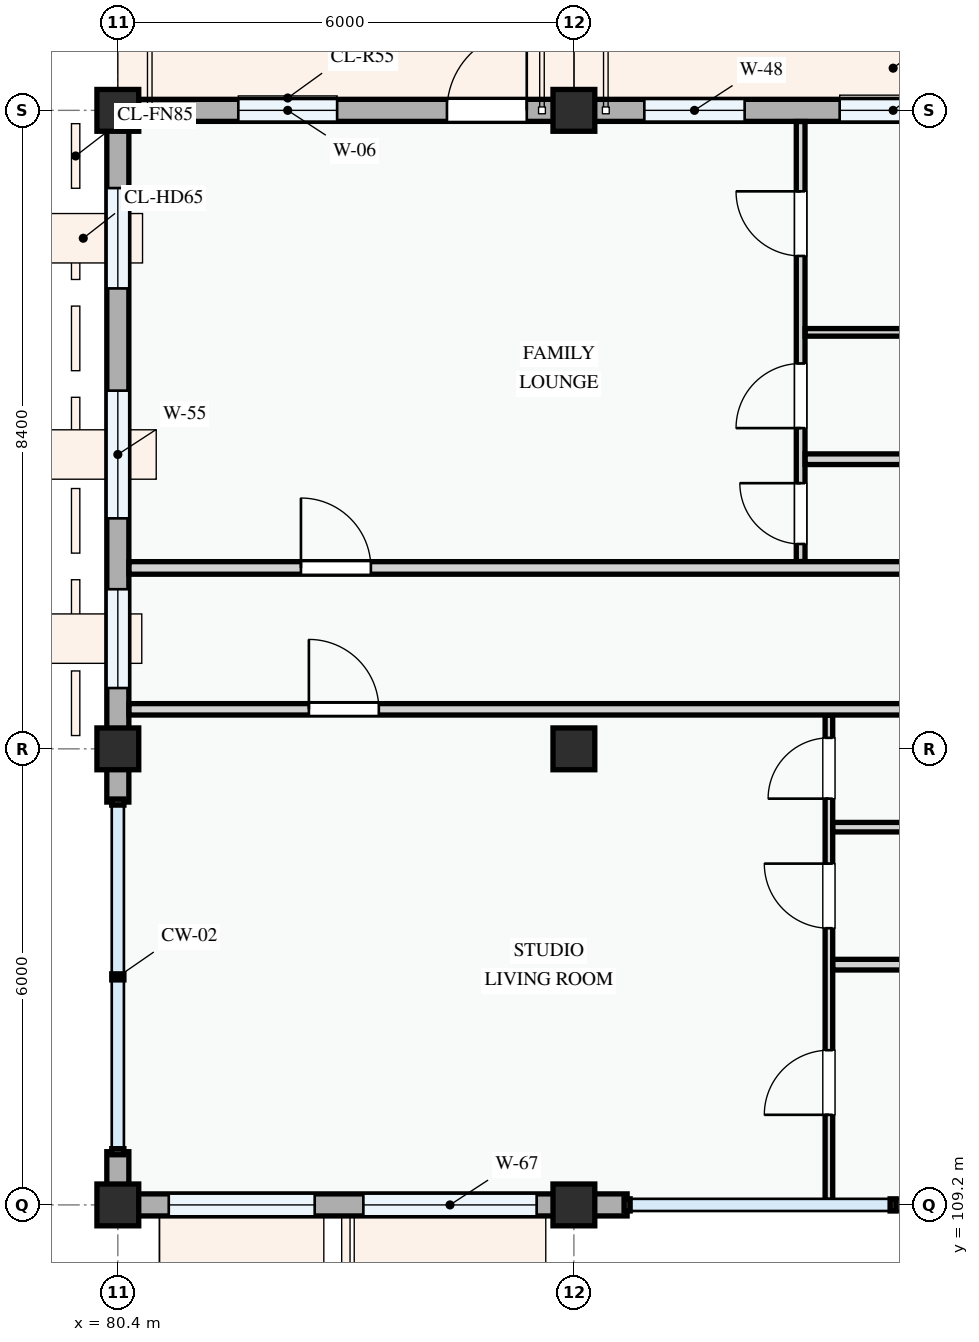
"""IFC4 building model, lengths in metres.
Left out: names, types, materials, properties, quantities, classifications, styles, units other than length and angle.
Written with IfcOpenShell. Run it as: python <this file> out.ifc"""

import sys

from ifc_helpers import new_model, si_unit, direction, frame, frame_2d, origin, origin_2d, place, context, subcontext, project, spatial, rectangle, extrude, element, fill, save


model = new_model("IFC4")
c1 = context("Model", 3, precision=1e-05, world=origin(), true_north=direction((0.0, 1.0)))
c2 = subcontext(c1, "Body", "Model", "MODEL_VIEW")
j1 = project(units=[si_unit("LENGTHUNIT", "METRE"), si_unit("PLANEANGLEUNIT", "RADIAN")], contexts=[c1])
p1 = place(None, origin())
s1 = spatial("IfcSite", under=j1, at=p1, CompositionType="ELEMENT")
p2 = place(p1, origin())
s2 = spatial("IfcBuilding", under=s1, at=p2, CompositionType="ELEMENT")
p3 = place(p2, frame((0.0, 0.0, 24.6)))
s3 = spatial("IfcBuildingStorey", under=s2, at=p3, CompositionType="ELEMENT", Elevation=24.6)
for number, where, z_axis, x_axis in (
    (1, (80.4, 109.2, 0.0), (0.0, 0.0, 1.0), (1.0, 0.0, 0.0)),
    (2, (80.4, 115.2, 0.0), (0.0, 0.0, 1.0), (1.0, 0.0, 0.0)),
    (3, (80.4, 123.6, 0.0), (0.0, 0.0, 1.0), (1.0, 0.0, 0.0)),
    (4, (86.4, 109.2, 0.0), (0.0, 0.0, 1.0), (1.0, 0.0, 0.0)),
    (5, (86.4, 115.2, 0.0), (0.0, 0.0, 1.0), (1.0, 0.0, 0.0)),
    (6, (86.4, 123.6, 0.0), (0.0, 0.0, 1.0), (1.0, 0.0, 0.0)),
):
    element("IfcColumn", number, at=place(p3, frame(where, z_axis=z_axis, x_axis=x_axis)), inside=s3, PredefinedType="COLUMN", context=c2, shape_type="SweptSolid", body=[
        extrude(rectangle(XDim=0.55, YDim=0.55, at=origin_2d()), origin(), (0.0, 0.0, 1.0), 3.3),
    ])
p4 = place(p3, frame((94.8, 123.6, 0.0), z_axis=(0.0, 0.0, 1.0), x_axis=(-1.0, 0.0, 0.0)))
e7 = element("IfcWall", 7, at=p4, inside=s3, PredefinedType="STANDARD", context=c2, shape_type="SweptSolid", body=[
    extrude(rectangle(XDim=8.4, YDim=0.29, at=frame_2d((4.2, 0.0))), origin(), (0.0, 0.0, 1.0), 2.375),
])
p5 = place(p4, frame((0.62, 0.0, 0.0)))
e8 = element("IfcOpeningElement", 8, at=p5, cuts=e7, PredefinedType="OPENING", context=c2, shape_type="SweptSolid", body=[
    extrude(rectangle(XDim=1.6, YDim=2.2, at=frame_2d((0.8, 1.1))), frame((0.0, 0.155, 0.0), z_axis=(0.0, -1.0, 0.0), x_axis=(1.0, 0.0, 0.0)), (0.0, 0.0, 1.0), 0.31),
])
p6 = place(p4, frame((2.783, 0.0, 0.78)))
e9 = element("IfcOpeningElement", 9, at=p6, cuts=e7, PredefinedType="OPENING", context=c2, shape_type="SweptSolid", body=[
    extrude(rectangle(XDim=2.12, YDim=1.44, at=frame_2d((1.06, 0.72))), frame((0.0, 0.155, 0.0), z_axis=(0.0, -1.0, 0.0), x_axis=(1.0, 0.0, 0.0)), (0.0, 0.0, 1.0), 0.31),
])
p7 = place(p4, frame((6.153, 0.0, 0.78)))
e10 = element("IfcOpeningElement", 10, at=p7, cuts=e7, PredefinedType="OPENING", context=c2, shape_type="SweptSolid", body=[
    extrude(rectangle(XDim=1.32, YDim=1.35, at=frame_2d((0.66, 0.675))), frame((0.0, 0.155, 0.0), z_axis=(0.0, -1.0, 0.0), x_axis=(1.0, 0.0, 0.0)), (0.0, 0.0, 1.0), 0.31),
])
p8 = place(p3, frame((86.4, 123.6, 0.0), z_axis=(0.0, 0.0, 1.0), x_axis=(-1.0, 0.0, 0.0)))
e11 = element("IfcWall", 11, at=p8, inside=s3, PredefinedType="STANDARD", context=c2, shape_type="SweptSolid", body=[
    extrude(rectangle(XDim=6.0, YDim=0.29, at=frame_2d((3.0, 0.0))), origin(), (0.0, 0.0, 1.0), 2.475),
])
p9 = place(p8, frame((0.62, 0.0, 0.0)))
e12 = element("IfcOpeningElement", 12, at=p9, cuts=e11, PredefinedType="OPENING", context=c2, shape_type="SweptSolid", body=[
    extrude(rectangle(XDim=1.05, YDim=2.15, at=frame_2d((0.525, 1.075))), frame((0.0, 0.155, 0.0), z_axis=(0.0, -1.0, 0.0), x_axis=(1.0, 0.0, 0.0)), (0.0, 0.0, 1.0), 0.31),
])
p10 = place(p8, frame((3.115, 0.0, 0.78)))
e13 = element("IfcOpeningElement", 13, at=p10, cuts=e11, PredefinedType="OPENING", context=c2, shape_type="SweptSolid", body=[
    extrude(rectangle(XDim=1.3, YDim=1.4, at=frame_2d((0.65, 0.7))), frame((0.0, 0.155, 0.0), z_axis=(0.0, -1.0, 0.0), x_axis=(1.0, 0.0, 0.0)), (0.0, 0.0, 1.0), 0.31),
])
p11 = place(p3, frame((80.4, 123.6, 0.0), z_axis=(0.0, 0.0, 1.0), x_axis=(0.0, -1.0, 0.0)))
e14 = element("IfcWall", 14, at=p11, inside=s3, PredefinedType="STANDARD", context=c2, shape_type="SweptSolid", body=[
    extrude(rectangle(XDim=8.4, YDim=0.29, at=frame_2d((4.2, 0.0))), origin(), (0.0, 0.0, 1.0), 2.425),
])
p12 = place(p11, frame((1.022, 0.0, 0.78)))
e15 = element("IfcOpeningElement", 15, at=p12, cuts=e14, PredefinedType="OPENING", context=c2, shape_type="SweptSolid", body=[
    extrude(rectangle(XDim=1.32, YDim=1.35, at=frame_2d((0.66, 0.675))), frame((0.0, 0.155, 0.0), z_axis=(0.0, -1.0, 0.0), x_axis=(1.0, 0.0, 0.0)), (0.0, 0.0, 1.0), 0.31),
])
p13 = place(p11, frame((3.688, 0.0, 0.78)))
e16 = element("IfcOpeningElement", 16, at=p13, cuts=e14, PredefinedType="OPENING", context=c2, shape_type="SweptSolid", body=[
    extrude(rectangle(XDim=1.68, YDim=1.46, at=frame_2d((0.84, 0.73))), frame((0.0, 0.155, 0.0), z_axis=(0.0, -1.0, 0.0), x_axis=(1.0, 0.0, 0.0)), (0.0, 0.0, 1.0), 0.31),
])
p14 = place(p11, frame((6.3, 0.0, 0.78)))
e17 = element("IfcOpeningElement", 17, at=p14, cuts=e14, PredefinedType="OPENING", context=c2, shape_type="SweptSolid", body=[
    extrude(rectangle(XDim=1.3, YDim=1.4, at=frame_2d((0.65, 0.7))), frame((0.0, 0.155, 0.0), z_axis=(0.0, -1.0, 0.0), x_axis=(1.0, 0.0, 0.0)), (0.0, 0.0, 1.0), 0.31),
])
p15 = place(p3, frame((80.4, 115.2, 0.0), z_axis=(0.0, 0.0, 1.0), x_axis=(0.0, -1.0, 0.0)))
e18 = element("IfcWall", 18, at=p15, inside=s3, PredefinedType="STANDARD", context=c2, shape_type="SweptSolid", body=[
    extrude(rectangle(XDim=0.7, YDim=0.29, at=frame_2d((0.35, 0.0))), origin(), (0.0, 0.0, 1.0), 2.575),
])
p16 = place(p3, frame((80.4, 109.9, 0.0), z_axis=(0.0, 0.0, 1.0), x_axis=(0.0, -1.0, 0.0)))
e19 = element("IfcWall", 19, at=p16, inside=s3, PredefinedType="STANDARD", context=c2, shape_type="SweptSolid", body=[
    extrude(rectangle(XDim=0.553, YDim=0.29, at=frame_2d((0.276, 0.0))), origin(), (0.0, 0.0, 1.0), 2.575),
])
p17 = place(p3, frame((80.4, 109.2, 0.0), z_axis=(0.0, 0.0, 1.0), x_axis=(1.0, 0.0, 0.0)))
e20 = element("IfcWall", 20, at=p17, inside=s3, PredefinedType="STANDARD", context=c2, shape_type="SweptSolid", body=[
    extrude(rectangle(XDim=6.0, YDim=0.29, at=frame_2d((3.0, 0.0))), origin(), (0.0, 0.0, 1.0), 2.475),
])
p18 = place(p17, frame((0.67, 0.0, 0.78)))
e21 = element("IfcOpeningElement", 21, at=p18, cuts=e20, PredefinedType="OPENING", context=c2, shape_type="SweptSolid", body=[
    extrude(rectangle(XDim=1.92, YDim=1.44, at=frame_2d((0.96, 0.72))), frame((0.0, 0.155, 0.0), z_axis=(0.0, -1.0, 0.0), x_axis=(1.0, 0.0, 0.0)), (0.0, 0.0, 1.0), 0.31),
])
p19 = place(p17, frame((3.23, 0.0, 0.78)))
e22 = element("IfcOpeningElement", 22, at=p19, cuts=e20, PredefinedType="OPENING", context=c2, shape_type="SweptSolid", body=[
    extrude(rectangle(XDim=2.28, YDim=1.46, at=frame_2d((1.14, 0.73))), frame((0.0, 0.155, 0.0), z_axis=(0.0, -1.0, 0.0), x_axis=(1.0, 0.0, 0.0)), (0.0, 0.0, 1.0), 0.31),
])
p20 = place(p3, frame((86.4, 109.2, 0.0), z_axis=(0.0, 0.0, 1.0), x_axis=(1.0, 0.0, 0.0)))
e23 = element("IfcWall", 23, at=p20, inside=s3, PredefinedType="STANDARD", context=c2, shape_type="SweptSolid", body=[
    extrude(rectangle(XDim=0.7, YDim=0.29, at=frame_2d((0.35, 0.0))), origin(), (0.0, 0.0, 1.0), 2.375),
])
p21 = place(p3, frame((89.755, 109.26, 0.0), z_axis=(0.0, 0.0, 1.0), x_axis=(0.0, 1.0, 0.0)))
e24 = element("IfcWall", 24, at=p21, inside=s3, PredefinedType="PARTITIONING", context=c2, shape_type="SweptSolid", body=[
    extrude(rectangle(XDim=6.383, YDim=0.1, at=frame_2d((3.191, 0.0))), origin(), (0.0, 0.0, 1.0), 3.0),
])
p22 = place(p21, frame((1.125, 0.0, 0.0)))
e25 = element("IfcOpeningElement", 25, at=p22, cuts=e24, PredefinedType="OPENING", context=c2, shape_type="SweptSolid", body=[
    extrude(rectangle(XDim=0.85, YDim=2.1, at=frame_2d((0.425, 1.05))), frame((0.0, 0.06, 0.0), z_axis=(0.0, -1.0, 0.0), x_axis=(1.0, 0.0, 0.0)), (0.0, 0.0, 1.0), 0.12),
])
p23 = place(p21, frame((3.58, 0.0, 0.0)))
e26 = element("IfcOpeningElement", 26, at=p23, cuts=e24, PredefinedType="OPENING", context=c2, shape_type="SweptSolid", body=[
    extrude(rectangle(XDim=0.85, YDim=2.1, at=frame_2d((0.425, 1.05))), frame((0.0, 0.06, 0.0), z_axis=(0.0, -1.0, 0.0), x_axis=(1.0, 0.0, 0.0)), (0.0, 0.0, 1.0), 0.12),
])
p24 = place(p21, frame((5.285, 0.0, 0.0)))
e27 = element("IfcOpeningElement", 27, at=p24, cuts=e24, PredefinedType="OPENING", context=c2, shape_type="SweptSolid", body=[
    extrude(rectangle(XDim=0.8, YDim=2.1, at=frame_2d((0.4, 1.05))), frame((0.0, 0.06, 0.0), z_axis=(0.0, -1.0, 0.0), x_axis=(1.0, 0.0, 0.0)), (0.0, 0.0, 1.0), 0.12),
])
p25 = place(p3, frame((89.807, 112.361, 0.0), z_axis=(0.0, 0.0, 1.0), x_axis=(1.0, 0.0, 0.0)))
e28 = element("IfcWall", 28, at=p25, inside=s3, PredefinedType="PARTITIONING", context=c2, shape_type="SweptSolid", body=[
    extrude(rectangle(XDim=9.141, YDim=0.14, at=frame_2d((4.571, 0.0))), origin(), (0.0, 0.0, 1.0), 3.0),
])
p26 = place(p3, frame((89.807, 114.17, 0.0), z_axis=(0.0, 0.0, 1.0), x_axis=(1.0, 0.0, 0.0)))
e29 = element("IfcWall", 29, at=p26, inside=s3, PredefinedType="PARTITIONING", context=c2, shape_type="SweptSolid", body=[
    extrude(rectangle(XDim=9.141, YDim=0.125, at=frame_2d((4.571, 0.0))), origin(), (0.0, 0.0, 1.0), 3.0),
])
p27 = place(p3, frame((89.383, 117.665, 0.0), z_axis=(0.0, 0.0, 1.0), x_axis=(0.0, 1.0, 0.0)))
e30 = element("IfcWall", 30, at=p27, inside=s3, PredefinedType="PARTITIONING", context=c2, shape_type="SweptSolid", body=[
    extrude(rectangle(XDim=5.788, YDim=0.115, at=frame_2d((2.894, 0.0))), origin(), (0.0, 0.0, 1.0), 3.0),
])
p28 = place(p27, frame((0.231, 0.0, 0.0)))
e31 = element("IfcOpeningElement", 31, at=p28, cuts=e30, PredefinedType="OPENING", context=c2, shape_type="SweptSolid", body=[
    extrude(rectangle(XDim=0.8, YDim=2.1, at=frame_2d((0.4, 1.05))), frame((0.0, 0.067, 0.0), z_axis=(0.0, -1.0, 0.0), x_axis=(1.0, 0.0, 0.0)), (0.0, 0.0, 1.0), 0.135),
])
p29 = place(p27, frame((1.755, 0.0, 0.0)))
e32 = element("IfcOpeningElement", 32, at=p29, cuts=e30, PredefinedType="OPENING", context=c2, shape_type="SweptSolid", body=[
    extrude(rectangle(XDim=0.85, YDim=2.1, at=frame_2d((0.425, 1.05))), frame((0.0, 0.067, 0.0), z_axis=(0.0, -1.0, 0.0), x_axis=(1.0, 0.0, 0.0)), (0.0, 0.0, 1.0), 0.135),
])
p30 = place(p27, frame((4.02, 0.0, 0.0)))
e33 = element("IfcOpeningElement", 33, at=p30, cuts=e30, PredefinedType="OPENING", context=c2, shape_type="SweptSolid", body=[
    extrude(rectangle(XDim=0.85, YDim=2.1, at=frame_2d((0.425, 1.05))), frame((0.0, 0.067, 0.0), z_axis=(0.0, -1.0, 0.0), x_axis=(1.0, 0.0, 0.0)), (0.0, 0.0, 1.0), 0.135),
])
p31 = place(p3, frame((89.443, 120.679, 0.0), z_axis=(0.0, 0.0, 1.0), x_axis=(1.0, 0.0, 0.0)))
e34 = element("IfcWall", 34, at=p31, inside=s3, PredefinedType="PARTITIONING", context=c2, shape_type="SweptSolid", body=[
    extrude(rectangle(XDim=9.495, YDim=0.1, at=frame_2d((4.748, 0.0))), origin(), (0.0, 0.0, 1.0), 3.0),
])
p32 = place(p3, frame((89.443, 119.01, 0.0), z_axis=(0.0, 0.0, 1.0), x_axis=(1.0, 0.0, 0.0)))
e35 = element("IfcWall", 35, at=p32, inside=s3, PredefinedType="PARTITIONING", context=c2, shape_type="SweptSolid", body=[
    extrude(rectangle(XDim=9.495, YDim=0.14, at=frame_2d((4.748, 0.0))), origin(), (0.0, 0.0, 1.0), 3.0),
])
p33 = place(p3, frame((80.547, 115.72, 0.0), z_axis=(0.0, 0.0, 1.0), x_axis=(1.0, 0.0, 0.0)))
e36 = element("IfcWall", 36, at=p33, inside=s3, PredefinedType="PARTITIONING", context=c2, shape_type="SweptSolid", body=[
    extrude(rectangle(XDim=69.503, YDim=0.15, at=frame_2d((34.751, 0.0))), origin(), (0.0, 0.0, 1.0), 3.0),
])
p34 = place(p33, frame((2.367, 0.0, 0.0)))
e37 = element("IfcOpeningElement", 37, at=p34, cuts=e36, PredefinedType="OPENING", context=c2, shape_type="SweptSolid", body=[
    extrude(rectangle(XDim=0.92, YDim=2.1, at=frame_2d((0.46, 1.05))), frame((0.0, 0.085, 0.0), z_axis=(0.0, -1.0, 0.0), x_axis=(1.0, 0.0, 0.0)), (0.0, 0.0, 1.0), 0.17),
])
p35 = place(p33, frame((23.968, 0.0, 0.0)))
e38 = element("IfcOpeningElement", 38, at=p35, cuts=e36, PredefinedType="OPENING", context=c2, shape_type="SweptSolid", body=[
    extrude(rectangle(XDim=0.92, YDim=2.1, at=frame_2d((0.46, 1.05))), frame((0.0, 0.085, 0.0), z_axis=(0.0, -1.0, 0.0), x_axis=(1.0, 0.0, 0.0)), (0.0, 0.0, 1.0), 0.17),
])
p36 = place(p33, frame((39.133, 0.0, 0.0)))
e39 = element("IfcOpeningElement", 39, at=p36, cuts=e36, PredefinedType="OPENING", context=c2, shape_type="SweptSolid", body=[
    extrude(rectangle(XDim=0.92, YDim=2.1, at=frame_2d((0.46, 1.05))), frame((0.0, 0.085, 0.0), z_axis=(0.0, -1.0, 0.0), x_axis=(1.0, 0.0, 0.0)), (0.0, 0.0, 1.0), 0.17),
])
p37 = place(p33, frame((59.909, 0.0, 0.0)))
e40 = element("IfcOpeningElement", 40, at=p37, cuts=e36, PredefinedType="OPENING", context=c2, shape_type="SweptSolid", body=[
    extrude(rectangle(XDim=0.96, YDim=2.12, at=frame_2d((0.48, 1.06))), frame((0.0, 0.085, 0.0), z_axis=(0.0, -1.0, 0.0), x_axis=(1.0, 0.0, 0.0)), (0.0, 0.0, 1.0), 0.17),
])
p38 = place(p3, frame((80.547, 117.58, 0.0), z_axis=(0.0, 0.0, 1.0), x_axis=(1.0, 0.0, 0.0)))
e41 = element("IfcWall", 41, at=p38, inside=s3, PredefinedType="PARTITIONING", context=c2, shape_type="SweptSolid", body=[
    extrude(rectangle(XDim=71.993, YDim=0.165, at=frame_2d((35.997, 0.0))), origin(), (0.0, 0.0, 1.0), 3.0),
])
p39 = place(p38, frame((2.262, 0.0, 0.0)))
e42 = element("IfcOpeningElement", 42, at=p39, cuts=e41, PredefinedType="OPENING", context=c2, shape_type="SweptSolid", body=[
    extrude(rectangle(XDim=0.92, YDim=2.1, at=frame_2d((0.46, 1.05))), frame((0.0, 0.093, 0.0), z_axis=(0.0, -1.0, 0.0), x_axis=(1.0, 0.0, 0.0)), (0.0, 0.0, 1.0), 0.185),
])
p40 = place(p38, frame((23.945, 0.0, 0.0)))
e43 = element("IfcOpeningElement", 43, at=p40, cuts=e41, PredefinedType="OPENING", context=c2, shape_type="SweptSolid", body=[
    extrude(rectangle(XDim=0.92, YDim=2.1, at=frame_2d((0.46, 1.05))), frame((0.0, 0.093, 0.0), z_axis=(0.0, -1.0, 0.0), x_axis=(1.0, 0.0, 0.0)), (0.0, 0.0, 1.0), 0.185),
])
p41 = place(p38, frame((39.133, 0.0, 0.0)))
e44 = element("IfcOpeningElement", 44, at=p41, cuts=e41, PredefinedType="OPENING", context=c2, shape_type="SweptSolid", body=[
    extrude(rectangle(XDim=0.92, YDim=2.1, at=frame_2d((0.46, 1.05))), frame((0.0, 0.093, 0.0), z_axis=(0.0, -1.0, 0.0), x_axis=(1.0, 0.0, 0.0)), (0.0, 0.0, 1.0), 0.185),
])
p42 = place(p38, frame((59.929, 0.0, 0.0)))
e45 = element("IfcOpeningElement", 45, at=p42, cuts=e41, PredefinedType="OPENING", context=c2, shape_type="SweptSolid", body=[
    extrude(rectangle(XDim=0.92, YDim=2.1, at=frame_2d((0.46, 1.05))), frame((0.0, 0.093, 0.0), z_axis=(0.0, -1.0, 0.0), x_axis=(1.0, 0.0, 0.0)), (0.0, 0.0, 1.0), 0.185),
])
p43 = place(p6, origin())
e46 = element("IfcWindow", 46, at=p43, inside=s3, PartitioningType="DOUBLE_PANEL_VERTICAL", PredefinedType="WINDOW", context=c2, shape_type="SweptSolid", body=[
    extrude(rectangle(XDim=2.12, YDim=1.44, at=frame_2d((1.06, 0.72))), frame((0.0, 0.03, 0.0), z_axis=(0.0, -1.0, 0.0), x_axis=(1.0, 0.0, 0.0)), (0.0, 0.0, 1.0), 0.06),
])
fill(e9, e46)
p44 = place(p7, origin())
e47 = element("IfcWindow", 47, at=p44, inside=s3, PartitioningType="SINGLE_PANEL", PredefinedType="WINDOW", context=c2, shape_type="SweptSolid", body=[
    extrude(rectangle(XDim=1.32, YDim=1.35, at=frame_2d((0.66, 0.675))), frame((0.0, 0.03, 0.0), z_axis=(0.0, -1.0, 0.0), x_axis=(1.0, 0.0, 0.0)), (0.0, 0.0, 1.0), 0.06),
])
fill(e10, e47)
p45 = place(p9, frame((1.05, 0.0, 0.0), z_axis=(0.0, 0.0, 1.0), x_axis=(-1.0, 0.0, 0.0)))
e48 = element("IfcDoor", 48, at=p45, inside=s3, OperationType="SINGLE_SWING_RIGHT", PredefinedType="DOOR", context=c2, shape_type="SweptSolid", body=[
    extrude(rectangle(XDim=1.05, YDim=2.15, at=frame_2d((0.525, 1.075))), frame((0.0, 0.025, 0.0), z_axis=(0.0, -1.0, 0.0), x_axis=(1.0, 0.0, 0.0)), (0.0, 0.0, 1.0), 0.05),
])
fill(e12, e48)
p46 = place(p10, origin())
e49 = element("IfcWindow", 49, at=p46, inside=s3, PartitioningType="SINGLE_PANEL", PredefinedType="WINDOW", context=c2, shape_type="SweptSolid", body=[
    extrude(rectangle(XDim=1.3, YDim=1.4, at=frame_2d((0.65, 0.7))), frame((0.0, 0.03, 0.0), z_axis=(0.0, -1.0, 0.0), x_axis=(1.0, 0.0, 0.0)), (0.0, 0.0, 1.0), 0.06),
])
fill(e13, e49)
p47 = place(p12, origin())
e50 = element("IfcWindow", 50, at=p47, inside=s3, PartitioningType="SINGLE_PANEL", PredefinedType="WINDOW", context=c2, shape_type="SweptSolid", body=[
    extrude(rectangle(XDim=1.32, YDim=1.35, at=frame_2d((0.66, 0.675))), frame((0.0, 0.03, 0.0), z_axis=(0.0, -1.0, 0.0), x_axis=(1.0, 0.0, 0.0)), (0.0, 0.0, 1.0), 0.06),
])
fill(e15, e50)
p48 = place(p13, origin())
e51 = element("IfcWindow", 51, at=p48, inside=s3, PartitioningType="DOUBLE_PANEL_VERTICAL", PredefinedType="WINDOW", context=c2, shape_type="SweptSolid", body=[
    extrude(rectangle(XDim=1.68, YDim=1.46, at=frame_2d((0.84, 0.73))), frame((0.0, 0.03, 0.0), z_axis=(0.0, -1.0, 0.0), x_axis=(1.0, 0.0, 0.0)), (0.0, 0.0, 1.0), 0.06),
])
fill(e16, e51)
p49 = place(p14, origin())
e52 = element("IfcWindow", 52, at=p49, inside=s3, PartitioningType="SINGLE_PANEL", PredefinedType="WINDOW", context=c2, shape_type="SweptSolid", body=[
    extrude(rectangle(XDim=1.3, YDim=1.4, at=frame_2d((0.65, 0.7))), frame((0.0, 0.03, 0.0), z_axis=(0.0, -1.0, 0.0), x_axis=(1.0, 0.0, 0.0)), (0.0, 0.0, 1.0), 0.06),
])
fill(e17, e52)
p50 = place(p18, origin())
e53 = element("IfcWindow", 53, at=p50, inside=s3, PartitioningType="DOUBLE_PANEL_VERTICAL", PredefinedType="WINDOW", context=c2, shape_type="SweptSolid", body=[
    extrude(rectangle(XDim=1.92, YDim=1.44, at=frame_2d((0.96, 0.72))), frame((0.0, 0.03, 0.0), z_axis=(0.0, -1.0, 0.0), x_axis=(1.0, 0.0, 0.0)), (0.0, 0.0, 1.0), 0.06),
])
fill(e21, e53)
p51 = place(p19, origin())
e54 = element("IfcWindow", 54, at=p51, inside=s3, PartitioningType="DOUBLE_PANEL_VERTICAL", PredefinedType="WINDOW", context=c2, shape_type="SweptSolid", body=[
    extrude(rectangle(XDim=2.28, YDim=1.46, at=frame_2d((1.14, 0.73))), frame((0.0, 0.03, 0.0), z_axis=(0.0, -1.0, 0.0), x_axis=(1.0, 0.0, 0.0)), (0.0, 0.0, 1.0), 0.06),
])
fill(e22, e54)
p52 = place(p22, origin())
e55 = element("IfcDoor", 55, at=p52, inside=s3, OperationType="SINGLE_SWING_LEFT", PredefinedType="DOOR", context=c2, shape_type="SweptSolid", body=[
    extrude(rectangle(XDim=0.85, YDim=2.1, at=frame_2d((0.425, 1.05))), frame((0.0, 0.025, 0.0), z_axis=(0.0, -1.0, 0.0), x_axis=(1.0, 0.0, 0.0)), (0.0, 0.0, 1.0), 0.05),
])
fill(e25, e55)
p53 = place(p23, origin())
e56 = element("IfcDoor", 56, at=p53, inside=s3, OperationType="SINGLE_SWING_RIGHT", PredefinedType="DOOR", context=c2, shape_type="SweptSolid", body=[
    extrude(rectangle(XDim=0.85, YDim=2.1, at=frame_2d((0.425, 1.05))), frame((0.0, 0.025, 0.0), z_axis=(0.0, -1.0, 0.0), x_axis=(1.0, 0.0, 0.0)), (0.0, 0.0, 1.0), 0.05),
])
fill(e26, e56)
p54 = place(p24, origin())
e57 = element("IfcDoor", 57, at=p54, inside=s3, OperationType="SINGLE_SWING_LEFT", PredefinedType="DOOR", context=c2, shape_type="SweptSolid", body=[
    extrude(rectangle(XDim=0.8, YDim=2.1, at=frame_2d((0.4, 1.05))), frame((0.0, 0.025, 0.0), z_axis=(0.0, -1.0, 0.0), x_axis=(1.0, 0.0, 0.0)), (0.0, 0.0, 1.0), 0.05),
])
fill(e27, e57)
p55 = place(p28, origin())
e58 = element("IfcDoor", 58, at=p55, inside=s3, OperationType="SINGLE_SWING_RIGHT", PredefinedType="DOOR", context=c2, shape_type="SweptSolid", body=[
    extrude(rectangle(XDim=0.8, YDim=2.1, at=frame_2d((0.4, 1.05))), frame((0.0, 0.025, 0.0), z_axis=(0.0, -1.0, 0.0), x_axis=(1.0, 0.0, 0.0)), (0.0, 0.0, 1.0), 0.05),
])
fill(e31, e58)
p56 = place(p29, origin())
e59 = element("IfcDoor", 59, at=p56, inside=s3, OperationType="SINGLE_SWING_LEFT", PredefinedType="DOOR", context=c2, shape_type="SweptSolid", body=[
    extrude(rectangle(XDim=0.85, YDim=2.1, at=frame_2d((0.425, 1.05))), frame((0.0, 0.025, 0.0), z_axis=(0.0, -1.0, 0.0), x_axis=(1.0, 0.0, 0.0)), (0.0, 0.0, 1.0), 0.05),
])
fill(e32, e59)
p57 = place(p30, origin())
e60 = element("IfcDoor", 60, at=p57, inside=s3, OperationType="SINGLE_SWING_RIGHT", PredefinedType="DOOR", context=c2, shape_type="SweptSolid", body=[
    extrude(rectangle(XDim=0.85, YDim=2.1, at=frame_2d((0.425, 1.05))), frame((0.0, 0.025, 0.0), z_axis=(0.0, -1.0, 0.0), x_axis=(1.0, 0.0, 0.0)), (0.0, 0.0, 1.0), 0.05),
])
fill(e33, e60)
p58 = place(p34, origin())
e61 = element("IfcDoor", 61, at=p58, inside=s3, OperationType="SINGLE_SWING_LEFT", PredefinedType="DOOR", context=c2, shape_type="SweptSolid", body=[
    extrude(rectangle(XDim=0.92, YDim=2.1, at=frame_2d((0.46, 1.05))), frame((0.0, 0.025, 0.0), z_axis=(0.0, -1.0, 0.0), x_axis=(1.0, 0.0, 0.0)), (0.0, 0.0, 1.0), 0.05),
])
fill(e37, e61)
p59 = place(p39, origin())
e62 = element("IfcDoor", 62, at=p59, inside=s3, OperationType="SINGLE_SWING_LEFT", PredefinedType="DOOR", context=c2, shape_type="SweptSolid", body=[
    extrude(rectangle(XDim=0.92, YDim=2.1, at=frame_2d((0.46, 1.05))), frame((0.0, 0.025, 0.0), z_axis=(0.0, -1.0, 0.0), x_axis=(1.0, 0.0, 0.0)), (0.0, 0.0, 1.0), 0.05),
])
fill(e42, e62)
save(model, sys.argv[1])
